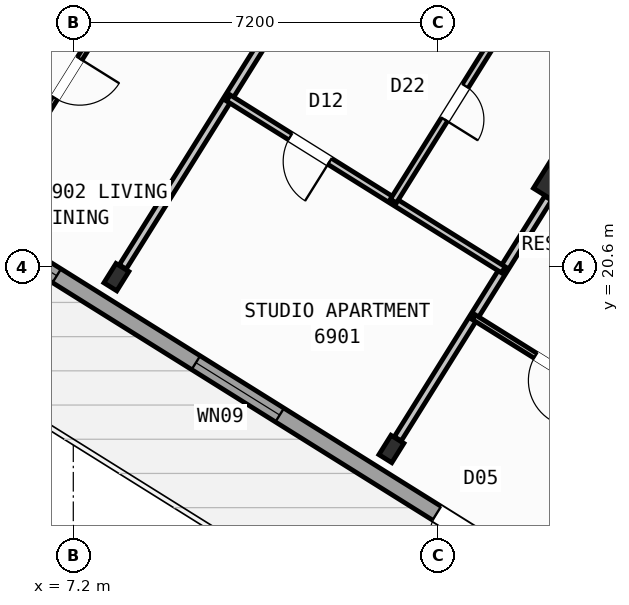
"""IFC4 building model, lengths in metres.
Left out: names, types, materials, properties, quantities, classifications, styles, units other than length and angle.
Written with IfcOpenShell. Run it as: python <this file> out.ifc"""

import sys

from ifc_helpers import new_model, si_unit, direction, frame, frame_2d, origin, origin_2d, place, context, subcontext, project, spatial, rectangle, hollow_rectangle, i_section, extrude, source, transform, mapped, element, fill, save


model = new_model("IFC4")
c1 = context("Model", 3, precision=1e-05, world=origin(), true_north=direction((0.0, 1.0)))
c2 = subcontext(c1, "Body", "Model", "MODEL_VIEW")
j1 = project(units=[si_unit("LENGTHUNIT", "METRE"), si_unit("PLANEANGLEUNIT", "RADIAN")], contexts=[c1])
p1 = place(None, origin())
s1 = spatial("IfcSite", under=j1, at=p1, CompositionType="ELEMENT")
p2 = place(p1, origin())
s2 = spatial("IfcBuilding", under=s1, at=p2, CompositionType="ELEMENT")
p3 = place(p2, frame((0.0, 0.0, 273.6)))
s3 = spatial("IfcBuildingStorey", under=s2, at=p3, CompositionType="ELEMENT", Elevation=273.6)
m1 = source(origin(), c2, "Body", "SweptSolid", [
    extrude(hollow_rectangle(XDim=0.7, YDim=0.7, WallThickness=0.028, at=origin_2d()), origin(), (0.0, 0.0, 1.0), 3.6),
])
p4 = place(p3, frame((16.764, 22.261, 0.0), z_axis=(0.0, 0.0, 1.0), x_axis=(-0.848048096156, 0.529919264233, 0.0)))
e1 = element("IfcColumn", 1, at=p4, inside=s3, PredefinedType="COLUMN", context=c2, shape_type="MappedRepresentation", body=[
    mapped(m1, transform((0.0, 0.0, 0.0), scale=1.0)),
])
m2 = source(origin(), c2, "Body", "SweptSolid", [
    extrude(i_section(OverallWidth=0.3, OverallDepth=0.45, WebThickness=0.014, FlangeThickness=0.026, at=origin_2d()), origin(), (0.0, 0.0, 1.0), 3.6),
])
for number, where, z_axis, x_axis in (
    (2, (13.478, 17.003, 0.0), (0.0, 0.0, 1.0), (-0.848, 0.53, 0.0)),
    (3, (8.051, 20.395, 0.0), (0.0, 0.0, 1.0), (-0.848, 0.53, 0.0)),
):
    element("IfcColumn", number, at=place(p3, frame(where, z_axis=z_axis, x_axis=x_axis)), inside=s3, PredefinedType="COLUMN", context=c2, shape_type="MappedRepresentation", body=[
        mapped(m2, transform((0.0, 0.0, 0.0), scale=1.0)),
    ])
p5 = place(p3, frame((29.268, 6.429, 0.0), z_axis=(0.0, 0.0, 1.0), x_axis=(-0.848049971435, 0.529916263149, 0.0)))
e4 = element("IfcWall", 4, at=p5, inside=s3, PredefinedType="STANDARD", context=c2, shape_type="SweptSolid", body=[
    extrude(rectangle(XDim=31.588, YDim=0.32, at=frame_2d((15.794, 0.0))), origin(), (0.0, 0.0, 1.0), 3.35),
])
p6 = place(p5, frame((16.362, 0.0, 0.0)))
e5 = element("IfcOpeningElement", 5, at=p6, cuts=e4, PredefinedType="OPENING", context=c2, shape_type="SweptSolid", body=[
    extrude(rectangle(XDim=1.2, YDim=2.15, at=frame_2d((0.6, 1.075))), frame((0.0, 0.17, 0.0), z_axis=(0.0, -1.0, 0.0), x_axis=(1.0, 0.0, 0.0)), (0.0, 0.0, 1.0), 0.34),
])
p7 = place(p5, frame((3.859, 0.0, 0.9)))
e6 = element("IfcOpeningElement", 6, at=p7, cuts=e4, PredefinedType="OPENING", context=c2, shape_type="SweptSolid", body=[
    extrude(rectangle(XDim=1.65, YDim=1.45, at=frame_2d((0.825, 0.725))), frame((0.0, 0.17, 0.0), z_axis=(0.0, -1.0, 0.0), x_axis=(1.0, 0.0, 0.0)), (0.0, 0.0, 1.0), 0.34),
])
p8 = place(p5, frame((10.519, 0.0, 0.9)))
e7 = element("IfcOpeningElement", 7, at=p8, cuts=e4, PredefinedType="OPENING", context=c2, shape_type="SweptSolid", body=[
    extrude(rectangle(XDim=1.65, YDim=1.45, at=frame_2d((0.825, 0.725))), frame((0.0, 0.17, 0.0), z_axis=(0.0, -1.0, 0.0), x_axis=(1.0, 0.0, 0.0)), (0.0, 0.0, 1.0), 0.34),
])
p9 = place(p5, frame((21.219, 0.0, 0.95)))
e8 = element("IfcOpeningElement", 8, at=p9, cuts=e4, PredefinedType="OPENING", context=c2, shape_type="SweptSolid", body=[
    extrude(rectangle(XDim=1.95, YDim=1.35, at=frame_2d((0.975, 0.675))), frame((0.0, 0.17, 0.0), z_axis=(0.0, -1.0, 0.0), x_axis=(1.0, 0.0, 0.0)), (0.0, 0.0, 1.0), 0.34),
])
p10 = place(p5, frame((26.406, 0.0, 1.0)))
e9 = element("IfcOpeningElement", 9, at=p10, cuts=e4, PredefinedType="OPENING", context=c2, shape_type="SweptSolid", body=[
    extrude(rectangle(XDim=0.9, YDim=1.25, at=frame_2d((0.45, 0.625))), frame((0.0, 0.17, 0.0), z_axis=(0.0, -1.0, 0.0), x_axis=(1.0, 0.0, 0.0)), (0.0, 0.0, 1.0), 0.34),
])
p11 = place(p5, frame((29.143, 0.0, 0.9)))
e10 = element("IfcOpeningElement", 10, at=p11, cuts=e4, PredefinedType="OPENING", context=c2, shape_type="SweptSolid", body=[
    extrude(rectangle(XDim=1.65, YDim=1.45, at=frame_2d((0.825, 0.725))), frame((0.0, 0.17, 0.0), z_axis=(0.0, -1.0, 0.0), x_axis=(1.0, 0.0, 0.0)), (0.0, 0.0, 1.0), 0.34),
])
p12 = place(p3, frame((2.415, 23.452, 0.0), z_axis=(0.0, 0.0, 1.0), x_axis=(0.52991049553, 0.848053575387, 0.0)))
e11 = element("IfcWall", 11, at=p12, inside=s3, PredefinedType="STANDARD", context=c2, shape_type="SweptSolid", body=[
    extrude(rectangle(XDim=21.587, YDim=0.32, at=frame_2d((10.794, 0.0))), origin(), (0.0, 0.0, 1.0), 2.875),
])
p13 = place(p12, frame((2.606, 0.0, 0.9)))
e12 = element("IfcOpeningElement", 12, at=p13, cuts=e11, PredefinedType="OPENING", context=c2, shape_type="SweptSolid", body=[
    extrude(rectangle(XDim=1.65, YDim=1.45, at=frame_2d((0.825, 0.725))), frame((0.0, 0.17, 0.0), z_axis=(0.0, -1.0, 0.0), x_axis=(1.0, 0.0, 0.0)), (0.0, 0.0, 1.0), 0.34),
])
p14 = place(p12, frame((7.504, 0.0, 1.0)))
e13 = element("IfcOpeningElement", 13, at=p14, cuts=e11, PredefinedType="OPENING", context=c2, shape_type="SweptSolid", body=[
    extrude(rectangle(XDim=0.9, YDim=1.25, at=frame_2d((0.45, 0.625))), frame((0.0, 0.17, 0.0), z_axis=(0.0, -1.0, 0.0), x_axis=(1.0, 0.0, 0.0)), (0.0, 0.0, 1.0), 0.34),
])
p15 = place(p12, frame((12.084, 0.0, 1.0)))
e14 = element("IfcOpeningElement", 14, at=p15, cuts=e11, PredefinedType="OPENING", context=c2, shape_type="SweptSolid", body=[
    extrude(rectangle(XDim=0.9, YDim=1.25, at=frame_2d((0.45, 0.625))), frame((0.0, 0.17, 0.0), z_axis=(0.0, -1.0, 0.0), x_axis=(1.0, 0.0, 0.0)), (0.0, 0.0, 1.0), 0.34),
])
p16 = place(p12, frame((15.619, 0.0, 1.0)))
e15 = element("IfcOpeningElement", 15, at=p16, cuts=e11, PredefinedType="OPENING", context=c2, shape_type="SweptSolid", body=[
    extrude(rectangle(XDim=0.9, YDim=1.25, at=frame_2d((0.45, 0.625))), frame((0.0, 0.17, 0.0), z_axis=(0.0, -1.0, 0.0), x_axis=(1.0, 0.0, 0.0)), (0.0, 0.0, 1.0), 0.34),
])
p17 = place(p12, frame((18.569, 0.0, 1.0)))
e16 = element("IfcOpeningElement", 16, at=p17, cuts=e11, PredefinedType="OPENING", context=c2, shape_type="SweptSolid", body=[
    extrude(rectangle(XDim=0.9, YDim=1.25, at=frame_2d((0.45, 0.625))), frame((0.0, 0.17, 0.0), z_axis=(0.0, -1.0, 0.0), x_axis=(1.0, 0.0, 0.0)), (0.0, 0.0, 1.0), 0.34),
])
p18 = place(p3, frame((21.329, 22.416, 0.0), z_axis=(0.0, 0.0, 1.0), x_axis=(-0.529920220799, -0.848047498427, 0.0)))
e17 = element("IfcWall", 17, at=p18, inside=s3, PredefinedType="PARTITIONING", context=c2, shape_type="SweptSolid", body=[
    extrude(rectangle(XDim=9.2, YDim=0.16, at=frame_2d((4.6, 0.0))), origin(), (0.0, 0.0, 1.0), 3.34),
])
p19 = place(p3, frame((22.495, 24.281, 0.0), z_axis=(0.0, 0.0, 1.0), x_axis=(-0.848052408131, 0.529912363569, 0.0)))
e18 = element("IfcWall", 18, at=p19, inside=s3, PredefinedType="PARTITIONING", context=c2, shape_type="SweptSolid", body=[
    extrude(rectangle(XDim=16.73, YDim=0.16, at=frame_2d((8.365, 0.0))), origin(), (0.0, 0.0, 1.0), 3.34),
])
p20 = place(p19, frame((2.22, 0.0, 0.0)))
e19 = element("IfcOpeningElement", 19, at=p20, cuts=e18, PredefinedType="OPENING", context=c2, shape_type="SweptSolid", body=[
    extrude(rectangle(XDim=0.86, YDim=2.05, at=frame_2d((0.43, 1.025))), frame((0.0, 0.09, 0.0), z_axis=(0.0, -1.0, 0.0), x_axis=(1.0, 0.0, 0.0)), (0.0, 0.0, 1.0), 0.18),
])
p21 = place(p19, frame((6.49, 0.0, 0.0)))
e20 = element("IfcOpeningElement", 20, at=p21, cuts=e18, PredefinedType="OPENING", context=c2, shape_type="SweptSolid", body=[
    extrude(rectangle(XDim=1.0, YDim=2.1, at=frame_2d((0.5, 1.05))), frame((0.0, 0.09, 0.0), z_axis=(0.0, -1.0, 0.0), x_axis=(1.0, 0.0, 0.0)), (0.0, 0.0, 1.0), 0.18),
])
p22 = place(p19, frame((14.76, 0.0, 0.0)))
e21 = element("IfcOpeningElement", 21, at=p22, cuts=e18, PredefinedType="OPENING", context=c2, shape_type="SweptSolid", body=[
    extrude(rectangle(XDim=1.0, YDim=2.1, at=frame_2d((0.5, 1.05))), frame((0.0, 0.09, 0.0), z_axis=(0.0, -1.0, 0.0), x_axis=(1.0, 0.0, 0.0)), (0.0, 0.0, 1.0), 0.18),
])
p23 = place(p3, frame((21.329, 22.416, 0.0), z_axis=(0.0, 0.0, 1.0), x_axis=(-0.848052408131, 0.529912363569, 0.0)))
e22 = element("IfcWall", 22, at=p23, inside=s3, PredefinedType="PARTITIONING", context=c2, shape_type="SweptSolid", body=[
    extrude(rectangle(XDim=16.73, YDim=0.16, at=frame_2d((8.365, 0.0))), origin(), (0.0, 0.0, 1.0), 3.34),
])
p24 = place(p23, frame((1.395, 0.0, 0.0)))
e23 = element("IfcOpeningElement", 23, at=p24, cuts=e22, PredefinedType="OPENING", context=c2, shape_type="SweptSolid", body=[
    extrude(rectangle(XDim=1.0, YDim=2.1, at=frame_2d((0.5, 1.05))), frame((0.0, 0.09, 0.0), z_axis=(0.0, -1.0, 0.0), x_axis=(1.0, 0.0, 0.0)), (0.0, 0.0, 1.0), 0.18),
])
p25 = place(p23, frame((7.82, 0.0, 0.0)))
e24 = element("IfcOpeningElement", 24, at=p25, cuts=e22, PredefinedType="OPENING", context=c2, shape_type="SweptSolid", body=[
    extrude(rectangle(XDim=1.0, YDim=2.1, at=frame_2d((0.5, 1.05))), frame((0.0, 0.09, 0.0), z_axis=(0.0, -1.0, 0.0), x_axis=(1.0, 0.0, 0.0)), (0.0, 0.0, 1.0), 0.18),
])
p26 = place(p23, frame((11.14, 0.0, 0.0)))
e25 = element("IfcOpeningElement", 25, at=p26, cuts=e22, PredefinedType="OPENING", context=c2, shape_type="SweptSolid", body=[
    extrude(rectangle(XDim=1.0, YDim=2.1, at=frame_2d((0.5, 1.05))), frame((0.0, 0.09, 0.0), z_axis=(0.0, -1.0, 0.0), x_axis=(1.0, 0.0, 0.0)), (0.0, 0.0, 1.0), 0.18),
])
p27 = place(p3, frame((16.572, 21.954, 0.0), z_axis=(0.0, 0.0, 1.0), x_axis=(-0.529904903214, -0.848057069748, 0.0)))
e26 = element("IfcWall", 26, at=p27, inside=s3, PredefinedType="PARTITIONING", context=c2, shape_type="SweptSolid", body=[
    extrude(rectangle(XDim=5.601, YDim=0.16, at=frame_2d((2.801, 0.0))), origin(), (0.0, 0.0, 1.0), 2.875),
])
p28 = place(p3, frame((18.318, 17.597, 0.0), z_axis=(0.0, 0.0, 1.0), x_axis=(-0.848059820872, 0.529900500304, 0.0)))
e27 = element("IfcWall", 27, at=p28, inside=s3, PredefinedType="PARTITIONING", context=c2, shape_type="SweptSolid", body=[
    extrude(rectangle(XDim=3.79, YDim=0.11, at=frame_2d((1.895, 0.0))), origin(), (0.0, 0.0, 1.0), 3.34),
])
p29 = place(p28, frame((1.435, 0.0, 0.0)))
e28 = element("IfcOpeningElement", 28, at=p29, cuts=e27, PredefinedType="OPENING", context=c2, shape_type="SweptSolid", body=[
    extrude(rectangle(XDim=0.92, YDim=2.08, at=frame_2d((0.46, 1.04))), frame((0.0, 0.065, 0.0), z_axis=(0.0, -1.0, 0.0), x_axis=(1.0, 0.0, 0.0)), (0.0, 0.0, 1.0), 0.13),
])
p30 = place(p3, frame((11.144, 25.346, 0.0), z_axis=(0.0, 0.0, 1.0), x_axis=(-0.529904903214, -0.848057069748, 0.0)))
e29 = element("IfcWall", 29, at=p30, inside=s3, PredefinedType="PARTITIONING", context=c2, shape_type="SweptSolid", body=[
    extrude(rectangle(XDim=5.601, YDim=0.16, at=frame_2d((2.801, 0.0))), origin(), (0.0, 0.0, 1.0), 2.875),
])
p31 = place(p3, frame((15.688, 20.54, 0.0), z_axis=(0.0, 0.0, 1.0), x_axis=(-0.848049732085, 0.529916646191, 0.0)))
e30 = element("IfcWall", 30, at=p31, inside=s3, PredefinedType="PLUMBINGWALL", context=c2, shape_type="SweptSolid", body=[
    extrude(rectangle(XDim=6.4, YDim=0.14, at=frame_2d((3.2, 0.0))), origin(), (0.0, 0.0, 1.0), 3.34),
])
p32 = place(p31, frame((4.04, 0.0, 0.0)))
e31 = element("IfcOpeningElement", 31, at=p32, cuts=e30, PredefinedType="OPENING", context=c2, shape_type="SweptSolid", body=[
    extrude(rectangle(XDim=0.92, YDim=2.08, at=frame_2d((0.46, 1.04))), frame((0.0, 0.08, 0.0), z_axis=(0.0, -1.0, 0.0), x_axis=(1.0, 0.0, 0.0)), (0.0, 0.0, 1.0), 0.16),
])
p33 = place(p3, frame((15.944, 25.781, 0.0), z_axis=(0.0, 0.0, 1.0), x_axis=(-0.529917480809, -0.848049210561, 0.0)))
e32 = element("IfcWall", 32, at=p33, inside=s3, PredefinedType="PLUMBINGWALL", context=c2, shape_type="SweptSolid", body=[
    extrude(rectangle(XDim=4.58, YDim=0.14, at=frame_2d((2.29, 0.0))), origin(), (0.0, 0.0, 1.0), 3.34),
])
p34 = place(p33, frame((1.9, 0.0, 0.0)))
e33 = element("IfcOpeningElement", 33, at=p34, cuts=e32, PredefinedType="OPENING", context=c2, shape_type="SweptSolid", body=[
    extrude(rectangle(XDim=0.78, YDim=2.05, at=frame_2d((0.39, 1.025))), frame((0.0, 0.08, 0.0), z_axis=(0.0, -1.0, 0.0), x_axis=(1.0, 0.0, 0.0)), (0.0, 0.0, 1.0), 0.16),
])
p35 = place(p3, frame((10.228, 29.352, 0.0), z_axis=(0.0, 0.0, 1.0), x_axis=(-0.529917830441, -0.848048992088, 0.0)))
e34 = element("IfcWall", 34, at=p35, inside=s3, PredefinedType="PARTITIONING", context=c2, shape_type="SweptSolid", body=[
    extrude(rectangle(XDim=9.47, YDim=0.11, at=frame_2d((4.735, 0.0))), origin(), (0.0, 0.0, 1.0), 3.34),
])
p36 = place(p35, frame((0.76, 0.0, 0.0)))
e35 = element("IfcOpeningElement", 35, at=p36, cuts=e34, PredefinedType="OPENING", context=c2, shape_type="SweptSolid", body=[
    extrude(rectangle(XDim=0.78, YDim=2.05, at=frame_2d((0.39, 1.025))), frame((0.0, 0.065, 0.0), z_axis=(0.0, -1.0, 0.0), x_axis=(1.0, 0.0, 0.0)), (0.0, 0.0, 1.0), 0.13),
])
p37 = place(p35, frame((5.475, 0.0, 0.0)))
e36 = element("IfcOpeningElement", 36, at=p37, cuts=e34, PredefinedType="OPENING", context=c2, shape_type="SweptSolid", body=[
    extrude(rectangle(XDim=0.92, YDim=2.08, at=frame_2d((0.46, 1.04))), frame((0.0, 0.065, 0.0), z_axis=(0.0, -1.0, 0.0), x_axis=(1.0, 0.0, 0.0)), (0.0, 0.0, 1.0), 0.13),
])
m3 = source(origin(), c2, "Body", "SweptSolid", [
    extrude(rectangle(XDim=1.2, YDim=2.15, at=frame_2d((0.6, 1.075))), frame((0.0, 0.025, 0.0), z_axis=(0.0, -1.0, 0.0), x_axis=(1.0, 0.0, 0.0)), (0.0, 0.0, 1.0), 0.05),
])
p38 = place(p6, origin())
e37 = element("IfcDoor", 37, at=p38, inside=s3, OperationType="SINGLE_SWING_LEFT", PredefinedType="DOOR", context=c2, shape_type="MappedRepresentation", body=[
    mapped(m3, transform((0.0, 0.0, 0.0), scale=1.0)),
])
fill(e5, e37)
m4 = source(origin(), c2, "Body", "SweptSolid", [
    extrude(rectangle(XDim=1.95, YDim=1.35, at=frame_2d((0.975, 0.675))), frame((0.0, 0.03, 0.0), z_axis=(0.0, -1.0, 0.0), x_axis=(1.0, 0.0, 0.0)), (0.0, 0.0, 1.0), 0.06),
])
p39 = place(p9, origin())
e38 = element("IfcWindow", 38, at=p39, inside=s3, PartitioningType="SINGLE_PANEL", PredefinedType="WINDOW", context=c2, shape_type="MappedRepresentation", body=[
    mapped(m4, transform((0.0, 0.0, 0.0), scale=1.0)),
])
fill(e8, e38)
m5 = source(origin(), c2, "Body", "SweptSolid", [
    extrude(rectangle(XDim=0.9, YDim=1.25, at=frame_2d((0.45, 0.625))), frame((0.0, 0.03, 0.0), z_axis=(0.0, -1.0, 0.0), x_axis=(1.0, 0.0, 0.0)), (0.0, 0.0, 1.0), 0.06),
])
p40 = place(p10, origin())
e39 = element("IfcWindow", 39, at=p40, inside=s3, PartitioningType="SINGLE_PANEL", PredefinedType="WINDOW", context=c2, shape_type="MappedRepresentation", body=[
    mapped(m5, transform((0.0, 0.0, 0.0), scale=1.0)),
])
fill(e9, e39)
m6 = source(origin(), c2, "Body", "SweptSolid", [
    extrude(rectangle(XDim=0.92, YDim=2.08, at=frame_2d((0.46, 1.04))), frame((0.0, 0.025, 0.0), z_axis=(0.0, -1.0, 0.0), x_axis=(1.0, 0.0, 0.0)), (0.0, 0.0, 1.0), 0.05),
])
p41 = place(p29, origin())
e40 = element("IfcDoor", 40, at=p41, inside=s3, OperationType="SINGLE_SWING_LEFT", PredefinedType="DOOR", context=c2, shape_type="MappedRepresentation", body=[
    mapped(m6, transform((0.0, 0.0, 0.0), scale=1.0)),
])
fill(e28, e40)
p42 = place(p32, origin())
e41 = element("IfcDoor", 41, at=p42, inside=s3, OperationType="SINGLE_SWING_LEFT", PredefinedType="DOOR", context=c2, shape_type="MappedRepresentation", body=[
    mapped(m6, transform((0.0, 0.0, 0.0), scale=1.0)),
])
fill(e31, e41)
m7 = source(origin(), c2, "Body", "SweptSolid", [
    extrude(rectangle(XDim=0.78, YDim=2.05, at=frame_2d((0.39, 1.025))), frame((0.0, 0.025, 0.0), z_axis=(0.0, -1.0, 0.0), x_axis=(1.0, 0.0, 0.0)), (0.0, 0.0, 1.0), 0.05),
])
p43 = place(p34, origin())
e42 = element("IfcDoor", 42, at=p43, inside=s3, OperationType="SINGLE_SWING_RIGHT", PredefinedType="DOOR", context=c2, shape_type="MappedRepresentation", body=[
    mapped(m7, transform((0.0, 0.0, 0.0), scale=1.0)),
])
fill(e33, e42)
p44 = place(p37, origin())
e43 = element("IfcDoor", 43, at=p44, inside=s3, OperationType="SINGLE_SWING_LEFT", PredefinedType="DOOR", context=c2, shape_type="MappedRepresentation", body=[
    mapped(m6, transform((0.0, 0.0, 0.0), scale=1.0)),
])
fill(e36, e43)
save(model, sys.argv[1])
